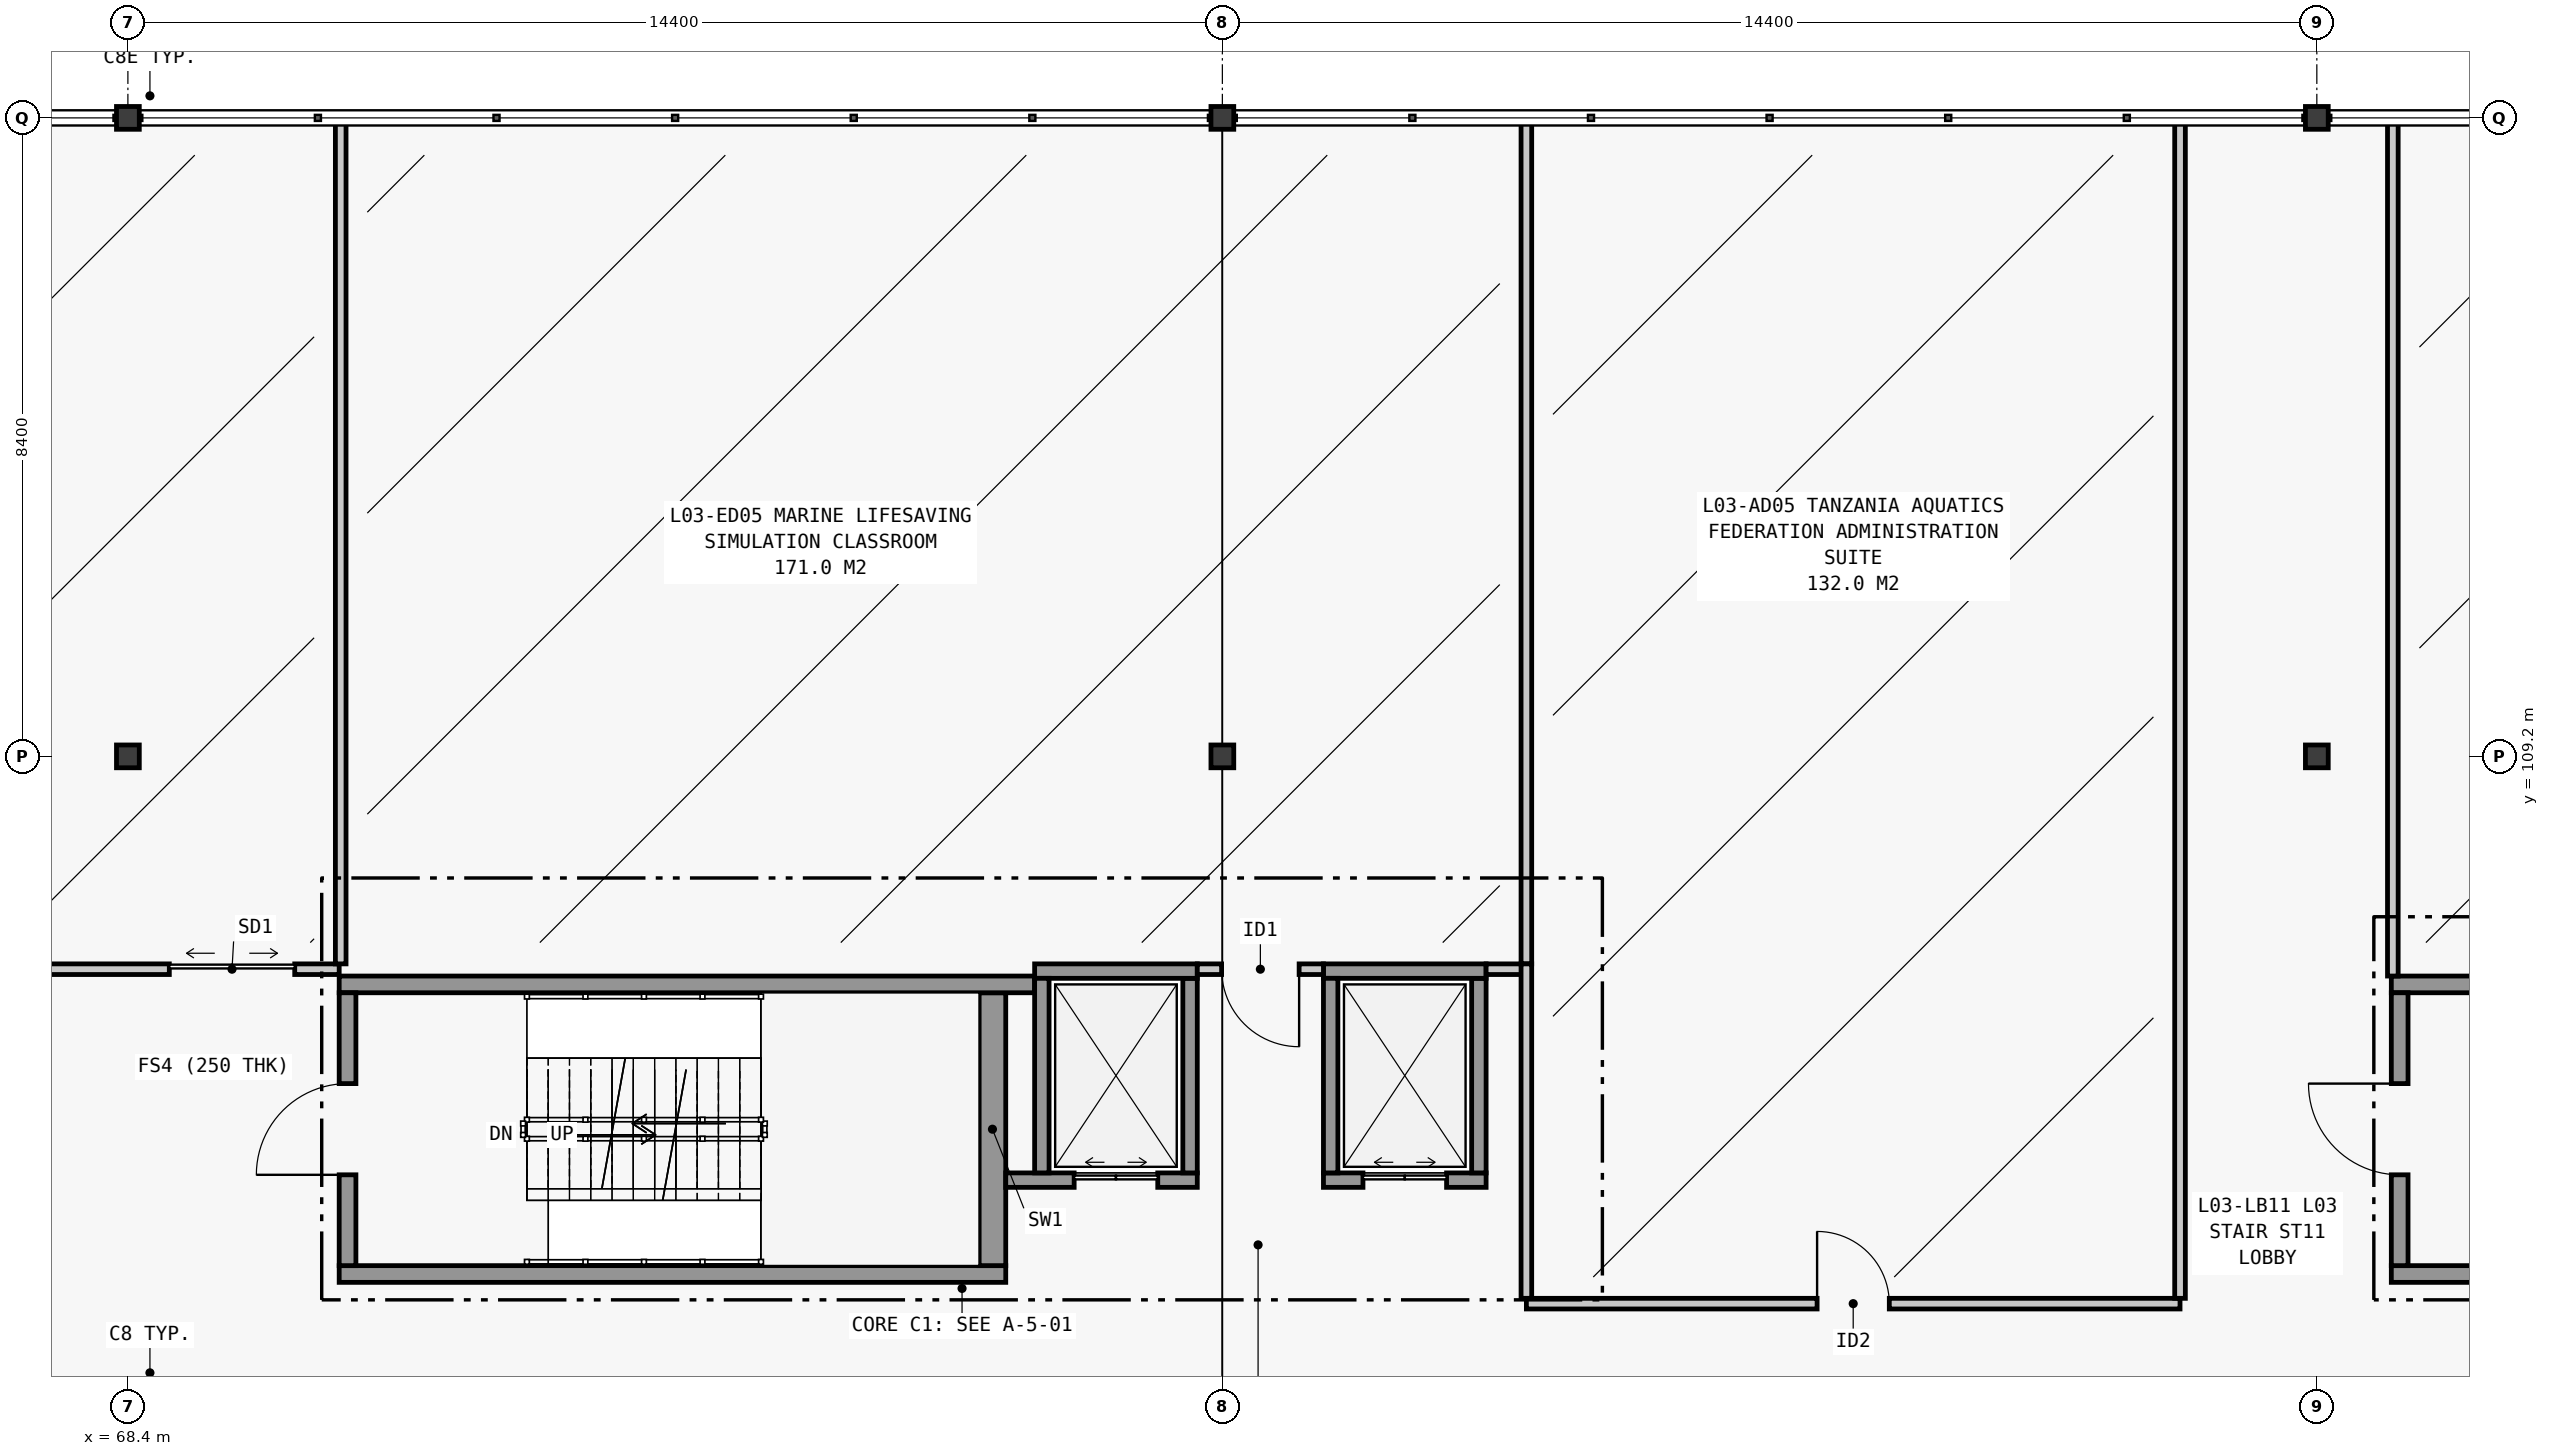
"""IFC4 building model, lengths in metres.
Left out: names, types, materials, properties, quantities, classifications, styles, units other than length and angle.
Written with IfcOpenShell. Run it as: python <this file> out.ifc"""

import sys

from ifc_helpers import new_model, si_unit, direction, frame, frame_2d, origin, origin_2d, place, context, subcontext, project, spatial, rectangle, i_section, extrude, element, fill, save


model = new_model("IFC4")
c1 = context("Model", 3, precision=1e-05, world=origin(), true_north=direction((0.0, 1.0)))
c2 = subcontext(c1, "Body", "Model", "MODEL_VIEW")
j1 = project(units=[si_unit("LENGTHUNIT", "METRE"), si_unit("PLANEANGLEUNIT", "RADIAN")], contexts=[c1])
p1 = place(None, origin())
s1 = spatial("IfcSite", under=j1, at=p1, CompositionType="ELEMENT")
p2 = place(p1, origin())
s2 = spatial("IfcBuilding", under=s1, at=p2, CompositionType="ELEMENT")
p3 = place(p2, frame((0.0, 0.0, 13.2)))
s3 = spatial("IfcBuildingStorey", under=s2, at=p3, CompositionType="ELEMENT", Elevation=13.2)
for number, where, z_axis, x_axis in (
    (1, (68.4, 109.2, 0.0), (0.0, 0.0, 1.0), (1.0, 0.0, 0.0)),
    (2, (68.4, 117.6, 0.0), (0.0, 0.0, 1.0), (1.0, 0.0, 0.0)),
    (3, (82.8, 109.2, 0.0), (0.0, 0.0, 1.0), (1.0, 0.0, 0.0)),
    (4, (82.8, 117.6, 0.0), (0.0, 0.0, 1.0), (1.0, 0.0, 0.0)),
    (5, (97.2, 109.2, 0.0), (0.0, 0.0, 1.0), (1.0, 0.0, 0.0)),
    (6, (97.2, 117.6, 0.0), (0.0, 0.0, 1.0), (1.0, 0.0, 0.0)),
):
    element("IfcColumn", number, at=place(p3, frame(where, z_axis=z_axis, x_axis=x_axis)), inside=s3, PredefinedType="COLUMN", context=c2, shape_type="SweptSolid", body=[
        extrude(i_section(OverallWidth=0.3, OverallDepth=0.3, WebThickness=0.011, FlangeThickness=0.019, FilletRadius=0.027, at=origin_2d()), origin(), (0.0, 0.0, 1.0), 4.2),
    ])
p4 = place(p3, frame((71.18, 102.39, 0.0), z_axis=(0.0, 0.0, 1.0), x_axis=(1.0, 0.0, 0.0)))
e7 = element("IfcWall", 7, at=p4, inside=s3, PredefinedType="SOLIDWALL", context=c2, shape_type="SweptSolid", body=[
    extrude(rectangle(XDim=8.77, YDim=0.22, at=frame_2d((4.385, 0.0))), origin(), (0.0, 0.0, 1.0), 3.97),
])
p5 = place(p3, frame((79.775, 102.5, 0.0), z_axis=(0.0, 0.0, 1.0), x_axis=(0.0, 1.0, 0.0)))
e8 = element("IfcWall", 8, at=p5, inside=s3, PredefinedType="SHEAR", context=c2, shape_type="SweptSolid", body=[
    extrude(rectangle(XDim=3.59, YDim=0.35, at=frame_2d((1.795, 0.0))), origin(), (0.0, 0.0, 1.0), 3.97),
])
p6 = place(p3, frame((80.33, 106.2, 0.0), z_axis=(0.0, 0.0, 1.0), x_axis=(-1.0, 0.0, 0.0)))
e9 = element("IfcWall", 9, at=p6, inside=s3, PredefinedType="SOLIDWALL", context=c2, shape_type="SweptSolid", body=[
    extrude(rectangle(XDim=9.15, YDim=0.22, at=frame_2d((4.575, 0.0))), origin(), (0.0, 0.0, 1.0), 3.97),
])
p7 = place(p3, frame((71.29, 106.09, 0.0), z_axis=(0.0, 0.0, 1.0), x_axis=(0.0, -1.0, 0.0)))
e10 = element("IfcWall", 10, at=p7, inside=s3, PredefinedType="SOLIDWALL", context=c2, shape_type="SweptSolid", body=[
    extrude(rectangle(XDim=3.59, YDim=0.22, at=frame_2d((1.795, 0.0))), origin(), (0.0, 0.0, 1.0), 3.97),
])
p8 = place(p7, frame((1.195, 0.0, 0.0)))
e11 = element("IfcOpeningElement", 11, at=p8, cuts=e10, PredefinedType="OPENING", context=c2, shape_type="SweptSolid", body=[
    extrude(rectangle(XDim=1.2, YDim=2.2, at=frame_2d((0.6, 1.1))), frame((0.0, 0.125, 0.0), z_axis=(0.0, -1.0, 0.0), x_axis=(1.0, 0.0, 0.0)), (0.0, 0.0, 1.0), 0.25),
])
for number, where, z_axis, x_axis in (
    (12, (98.18, 102.39, 0.0), (0.0, 0.0, 1.0), (1.0, 0.0, 0.0)),
    (13, (106.95, 106.2, 0.0), (0.0, 0.0, 1.0), (-1.0, 0.0, 0.0)),
):
    element("IfcWall", number, at=place(p3, frame(where, z_axis=z_axis, x_axis=x_axis)), inside=s3, PredefinedType="SOLIDWALL", context=c2, shape_type="SweptSolid", body=[
        extrude(rectangle(XDim=8.77, YDim=0.22, at=frame_2d((4.385, 0.0))), origin(), (0.0, 0.0, 1.0), 3.97),
    ])
p9 = place(p3, frame((98.29, 106.09, 0.0), z_axis=(0.0, 0.0, 1.0), x_axis=(0.0, -1.0, 0.0)))
e14 = element("IfcWall", 14, at=p9, inside=s3, PredefinedType="SOLIDWALL", context=c2, shape_type="SweptSolid", body=[
    extrude(rectangle(XDim=3.59, YDim=0.22, at=frame_2d((1.795, 0.0))), origin(), (0.0, 0.0, 1.0), 3.97),
])
p10 = place(p9, frame((1.195, 0.0, 0.0)))
e15 = element("IfcOpeningElement", 15, at=p10, cuts=e14, PredefinedType="OPENING", context=c2, shape_type="SweptSolid", body=[
    extrude(rectangle(XDim=1.2, YDim=2.2, at=frame_2d((0.6, 1.1))), frame((0.0, 0.125, 0.0), z_axis=(0.0, -1.0, 0.0), x_axis=(1.0, 0.0, 0.0)), (0.0, 0.0, 1.0), 0.25),
])
p11 = place(p3, frame((79.95, 103.625, 0.0), z_axis=(0.0, 0.0, 1.0), x_axis=(1.0, 0.0, 0.0)))
e16 = element("IfcWall", 16, at=p11, inside=s3, PredefinedType="SOLIDWALL", context=c2, shape_type="SweptSolid", body=[
    extrude(rectangle(XDim=2.52, YDim=0.19, at=frame_2d((1.26, 0.0))), origin(), (0.0, 0.0, 1.0), 3.97),
])
p12 = place(p11, frame((0.9, 0.0, 0.0)))
e17 = element("IfcOpeningElement", 17, at=p12, cuts=e16, PredefinedType="OPENING", context=c2, shape_type="SweptSolid", body=[
    extrude(rectangle(XDim=1.1, YDim=2.2, at=frame_2d((0.55, 1.1))), frame((0.0, 0.11, 0.0), z_axis=(0.0, -1.0, 0.0), x_axis=(1.0, 0.0, 0.0)), (0.0, 0.0, 1.0), 0.22),
])
p13 = place(p3, frame((82.375, 103.72, 0.0), z_axis=(0.0, 0.0, 1.0), x_axis=(0.0, 1.0, 0.0)))
e18 = element("IfcWall", 18, at=p13, inside=s3, PredefinedType="SOLIDWALL", context=c2, shape_type="SweptSolid", body=[
    extrude(rectangle(XDim=2.56, YDim=0.19, at=frame_2d((1.28, 0.0))), origin(), (0.0, 0.0, 1.0), 3.97),
])
p14 = place(p3, frame((82.47, 106.375, 0.0), z_axis=(0.0, 0.0, 1.0), x_axis=(-1.0, 0.0, 0.0)))
e19 = element("IfcWall", 19, at=p14, inside=s3, PredefinedType="SOLIDWALL", context=c2, shape_type="SweptSolid", body=[
    extrude(rectangle(XDim=2.14, YDim=0.19, at=frame_2d((1.07, 0.0))), origin(), (0.0, 0.0, 1.0), 3.97),
])
p15 = place(p3, frame((80.425, 106.28, 0.0), z_axis=(0.0, 0.0, 1.0), x_axis=(0.0, -1.0, 0.0)))
e20 = element("IfcWall", 20, at=p15, inside=s3, PredefinedType="SOLIDWALL", context=c2, shape_type="SweptSolid", body=[
    extrude(rectangle(XDim=2.56, YDim=0.19, at=frame_2d((1.28, 0.0))), origin(), (0.0, 0.0, 1.0), 3.97),
])
p16 = place(p3, frame((84.13, 103.625, 0.0), z_axis=(0.0, 0.0, 1.0), x_axis=(1.0, 0.0, 0.0)))
e21 = element("IfcWall", 21, at=p16, inside=s3, PredefinedType="SOLIDWALL", context=c2, shape_type="SweptSolid", body=[
    extrude(rectangle(XDim=2.14, YDim=0.19, at=frame_2d((1.07, 0.0))), origin(), (0.0, 0.0, 1.0), 3.97),
])
p17 = place(p16, frame((0.52, 0.0, 0.0)))
e22 = element("IfcOpeningElement", 22, at=p17, cuts=e21, PredefinedType="OPENING", context=c2, shape_type="SweptSolid", body=[
    extrude(rectangle(XDim=1.1, YDim=2.2, at=frame_2d((0.55, 1.1))), frame((0.0, 0.11, 0.0), z_axis=(0.0, -1.0, 0.0), x_axis=(1.0, 0.0, 0.0)), (0.0, 0.0, 1.0), 0.22),
])
p18 = place(p3, frame((86.175, 103.72, 0.0), z_axis=(0.0, 0.0, 1.0), x_axis=(0.0, 1.0, 0.0)))
e23 = element("IfcWall", 23, at=p18, inside=s3, PredefinedType="SOLIDWALL", context=c2, shape_type="SweptSolid", body=[
    extrude(rectangle(XDim=2.56, YDim=0.19, at=frame_2d((1.28, 0.0))), origin(), (0.0, 0.0, 1.0), 3.97),
])
p19 = place(p3, frame((86.27, 106.375, 0.0), z_axis=(0.0, 0.0, 1.0), x_axis=(-1.0, 0.0, 0.0)))
e24 = element("IfcWall", 24, at=p19, inside=s3, PredefinedType="SOLIDWALL", context=c2, shape_type="SweptSolid", body=[
    extrude(rectangle(XDim=2.14, YDim=0.19, at=frame_2d((1.07, 0.0))), origin(), (0.0, 0.0, 1.0), 3.97),
])
p20 = place(p3, frame((84.225, 106.28, 0.0), z_axis=(0.0, 0.0, 1.0), x_axis=(0.0, -1.0, 0.0)))
e25 = element("IfcWall", 25, at=p20, inside=s3, PredefinedType="SOLIDWALL", context=c2, shape_type="SweptSolid", body=[
    extrude(rectangle(XDim=2.56, YDim=0.19, at=frame_2d((1.28, 0.0))), origin(), (0.0, 0.0, 1.0), 3.97),
])
p21 = place(p3, frame((65.7, 106.4, 0.0), z_axis=(0.0, 0.0, 1.0), x_axis=(1.0, 0.0, 0.0)))
e26 = element("IfcWall", 26, at=p21, inside=s3, PredefinedType="PARTITIONING", context=c2, shape_type="SweptSolid", body=[
    extrude(rectangle(XDim=5.48, YDim=0.14, at=frame_2d((2.74, 0.0))), origin(), (0.0, 0.0, 1.0), 3.97),
])
p22 = place(p21, frame((3.245, 0.0, 0.0)))
e27 = element("IfcOpeningElement", 27, at=p22, cuts=e26, PredefinedType="OPENING", context=c2, shape_type="SweptSolid", body=[
    extrude(rectangle(XDim=1.65, YDim=2.25, at=frame_2d((0.825, 1.125))), frame((0.0, 0.085, 0.0), z_axis=(0.0, -1.0, 0.0), x_axis=(1.0, 0.0, 0.0)), (0.0, 0.0, 1.0), 0.17),
])
p23 = place(p3, frame((71.2, 106.47, 0.0), z_axis=(0.0, 0.0, 1.0), x_axis=(0.0, 1.0, 0.0)))
e28 = element("IfcWall", 28, at=p23, inside=s3, PredefinedType="PARTITIONING", context=c2, shape_type="SweptSolid", body=[
    extrude(rectangle(XDim=11.11, YDim=0.14, at=frame_2d((5.555, 0.0))), origin(), (0.0, 0.0, 1.0), 3.97),
])
p24 = place(p3, frame((82.47, 106.4, 0.0), z_axis=(0.0, 0.0, 1.0), x_axis=(1.0, 0.0, 0.0)))
e29 = element("IfcWall", 29, at=p24, inside=s3, PredefinedType="PARTITIONING", context=c2, shape_type="SweptSolid", body=[
    extrude(rectangle(XDim=1.66, YDim=0.14, at=frame_2d((0.83, 0.0))), origin(), (0.0, 0.0, 1.0), 3.97),
])
p25 = place(p24, frame((0.32, 0.0, 0.0)))
e30 = element("IfcOpeningElement", 30, at=p25, cuts=e29, PredefinedType="OPENING", context=c2, shape_type="SweptSolid", body=[
    extrude(rectangle(XDim=1.02, YDim=2.15, at=frame_2d((0.51, 1.075))), frame((0.0, 0.085, 0.0), z_axis=(0.0, -1.0, 0.0), x_axis=(1.0, 0.0, 0.0)), (0.0, 0.0, 1.0), 0.17),
])
p26 = place(p3, frame((86.27, 106.4, 0.0), z_axis=(0.0, 0.0, 1.0), x_axis=(1.0, 0.0, 0.0)))
e31 = element("IfcWall", 31, at=p26, inside=s3, PredefinedType="PARTITIONING", context=c2, shape_type="SweptSolid", body=[
    extrude(rectangle(XDim=0.53, YDim=0.14, at=frame_2d((0.265, 0.0))), origin(), (0.0, 0.0, 1.0), 3.97),
])
p27 = place(p3, frame((86.8, 106.47, 0.0), z_axis=(0.0, 0.0, 1.0), x_axis=(0.0, 1.0, 0.0)))
e32 = element("IfcWall", 32, at=p27, inside=s3, PredefinedType="PARTITIONING", context=c2, shape_type="SweptSolid", body=[
    extrude(rectangle(XDim=11.11, YDim=0.14, at=frame_2d((5.555, 0.0))), origin(), (0.0, 0.0, 1.0), 3.97),
])
p28 = place(p3, frame((86.8, 102.0, 0.0), z_axis=(0.0, 0.0, 1.0), x_axis=(1.0, 0.0, 0.0)))
e33 = element("IfcWall", 33, at=p28, inside=s3, PredefinedType="PARTITIONING", context=c2, shape_type="SweptSolid", body=[
    extrude(rectangle(XDim=8.6, YDim=0.14, at=frame_2d((4.3, 0.0))), origin(), (0.0, 0.0, 1.0), 3.97),
])
p29 = place(p28, frame((3.825, 0.0, 0.0)))
e34 = element("IfcOpeningElement", 34, at=p29, cuts=e33, PredefinedType="OPENING", context=c2, shape_type="SweptSolid", body=[
    extrude(rectangle(XDim=0.95, YDim=2.15, at=frame_2d((0.475, 1.075))), frame((0.0, 0.085, 0.0), z_axis=(0.0, -1.0, 0.0), x_axis=(1.0, 0.0, 0.0)), (0.0, 0.0, 1.0), 0.17),
])
p30 = place(p3, frame((86.8, 102.07, 0.0), z_axis=(0.0, 0.0, 1.0), x_axis=(0.0, 1.0, 0.0)))
e35 = element("IfcWall", 35, at=p30, inside=s3, PredefinedType="PARTITIONING", context=c2, shape_type="SweptSolid", body=[
    extrude(rectangle(XDim=4.4, YDim=0.14, at=frame_2d((2.2, 0.0))), origin(), (0.0, 0.0, 1.0), 3.97),
])
p31 = place(p3, frame((95.4, 102.07, 0.0), z_axis=(0.0, 0.0, 1.0), x_axis=(0.0, 1.0, 0.0)))
e36 = element("IfcWall", 36, at=p31, inside=s3, PredefinedType="PARTITIONING", context=c2, shape_type="SweptSolid", body=[
    extrude(rectangle(XDim=15.51, YDim=0.14, at=frame_2d((7.755, 0.0))), origin(), (0.0, 0.0, 1.0), 3.97),
])
p32 = place(p3, frame((98.2, 106.31, 0.0), z_axis=(0.0, 0.0, 1.0), x_axis=(0.0, 1.0, 0.0)))
e37 = element("IfcWall", 37, at=p32, inside=s3, PredefinedType="PARTITIONING", context=c2, shape_type="SweptSolid", body=[
    extrude(rectangle(XDim=11.27, YDim=0.14, at=frame_2d((5.635, 0.0))), origin(), (0.0, 0.0, 1.0), 3.97),
])
p33 = place(p8, frame((1.2, 0.0, 0.0), z_axis=(0.0, 0.0, 1.0), x_axis=(-1.0, 0.0, 0.0)))
e38 = element("IfcDoor", 38, at=p33, inside=s3, OperationType="SINGLE_SWING_RIGHT", PredefinedType="DOOR", context=c2, shape_type="SweptSolid", body=[
    extrude(rectangle(XDim=1.2, YDim=2.2, at=frame_2d((0.6, 1.1))), frame((0.0, 0.025, 0.0), z_axis=(0.0, -1.0, 0.0), x_axis=(1.0, 0.0, 0.0)), (0.0, 0.0, 1.0), 0.05),
])
fill(e11, e38)
p34 = place(p10, frame((1.2, 0.0, 0.0), z_axis=(0.0, 0.0, 1.0), x_axis=(-1.0, 0.0, 0.0)))
e39 = element("IfcDoor", 39, at=p34, inside=s3, OperationType="SINGLE_SWING_LEFT", PredefinedType="DOOR", context=c2, shape_type="SweptSolid", body=[
    extrude(rectangle(XDim=1.2, YDim=2.2, at=frame_2d((0.6, 1.1))), frame((0.0, 0.025, 0.0), z_axis=(0.0, -1.0, 0.0), x_axis=(1.0, 0.0, 0.0)), (0.0, 0.0, 1.0), 0.05),
])
fill(e15, e39)
p35 = place(p12, origin())
e40 = element("IfcDoor", 40, at=p35, inside=s3, OperationType="DOUBLE_DOOR_SLIDING", PredefinedType="DOOR", context=c2, shape_type="SweptSolid", body=[
    extrude(rectangle(XDim=1.1, YDim=2.2, at=frame_2d((0.55, 1.1))), frame((0.0, 0.025, 0.0), z_axis=(0.0, -1.0, 0.0), x_axis=(1.0, 0.0, 0.0)), (0.0, 0.0, 1.0), 0.05),
])
fill(e17, e40)
p36 = place(p17, origin())
e41 = element("IfcDoor", 41, at=p36, inside=s3, OperationType="DOUBLE_DOOR_SLIDING", PredefinedType="DOOR", context=c2, shape_type="SweptSolid", body=[
    extrude(rectangle(XDim=1.1, YDim=2.2, at=frame_2d((0.55, 1.1))), frame((0.0, 0.025, 0.0), z_axis=(0.0, -1.0, 0.0), x_axis=(1.0, 0.0, 0.0)), (0.0, 0.0, 1.0), 0.05),
])
fill(e22, e41)
p37 = place(p22, origin())
e42 = element("IfcDoor", 42, at=p37, inside=s3, OperationType="DOUBLE_DOOR_SLIDING", PredefinedType="DOOR", context=c2, shape_type="SweptSolid", body=[
    extrude(rectangle(XDim=1.65, YDim=2.25, at=frame_2d((0.825, 1.125))), frame((0.0, 0.025, 0.0), z_axis=(0.0, -1.0, 0.0), x_axis=(1.0, 0.0, 0.0)), (0.0, 0.0, 1.0), 0.05),
])
fill(e27, e42)
p38 = place(p25, frame((1.02, 0.0, 0.0), z_axis=(0.0, 0.0, 1.0), x_axis=(-1.0, 0.0, 0.0)))
e43 = element("IfcDoor", 43, at=p38, inside=s3, OperationType="SINGLE_SWING_RIGHT", PredefinedType="DOOR", context=c2, shape_type="SweptSolid", body=[
    extrude(rectangle(XDim=1.02, YDim=2.15, at=frame_2d((0.51, 1.075))), frame((0.0, 0.025, 0.0), z_axis=(0.0, -1.0, 0.0), x_axis=(1.0, 0.0, 0.0)), (0.0, 0.0, 1.0), 0.05),
])
fill(e30, e43)
p39 = place(p29, origin())
e44 = element("IfcDoor", 44, at=p39, inside=s3, OperationType="SINGLE_SWING_LEFT", PredefinedType="DOOR", context=c2, shape_type="SweptSolid", body=[
    extrude(rectangle(XDim=0.95, YDim=2.15, at=frame_2d((0.475, 1.075))), frame((0.0, 0.025, 0.0), z_axis=(0.0, -1.0, 0.0), x_axis=(1.0, 0.0, 0.0)), (0.0, 0.0, 1.0), 0.05),
])
fill(e34, e44)
save(model, sys.argv[1])
